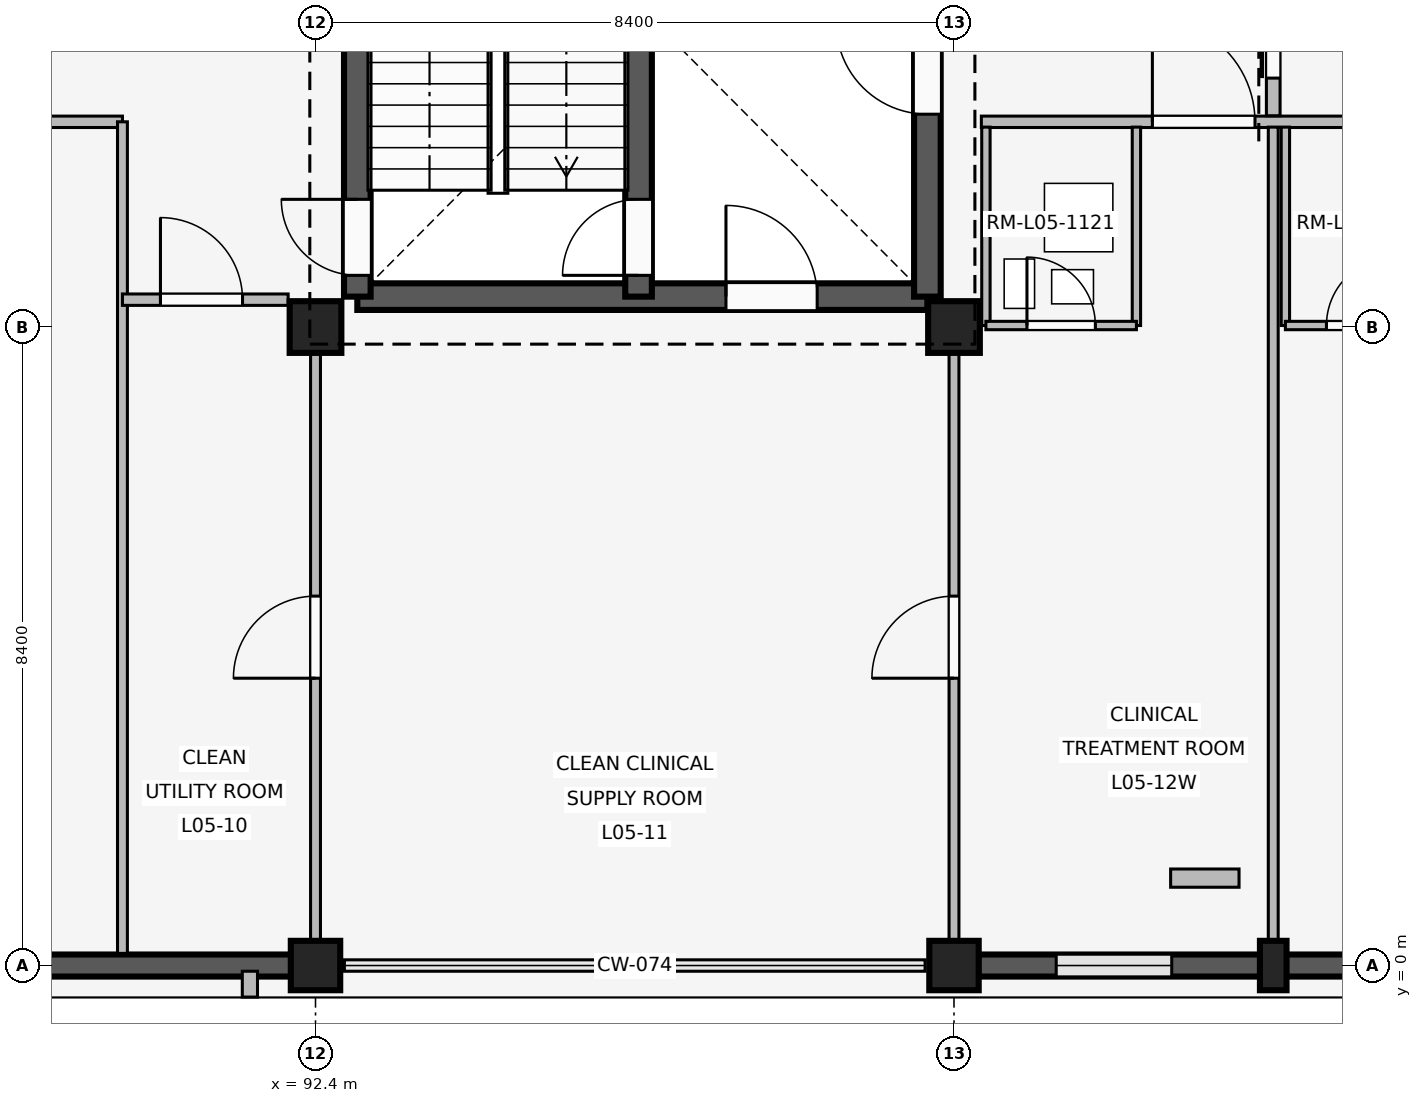
"""IFC4 building model, lengths in metres.
Left out: names, types, materials, properties, quantities, classifications, styles, units other than length and angle.
Written with IfcOpenShell. Run it as: python <this file> out.ifc"""

import sys

from ifc_helpers import new_model, si_unit, direction, frame, frame_2d, origin, origin_2d, place, context, subcontext, project, spatial, rectangle, extrude, element, fill, save


model = new_model("IFC4")
c1 = context("Model", 3, precision=1e-05, world=origin(), true_north=direction((0.0, 1.0)))
c2 = subcontext(c1, "Body", "Model", "MODEL_VIEW")
j1 = project(units=[si_unit("LENGTHUNIT", "METRE"), si_unit("PLANEANGLEUNIT", "RADIAN")], contexts=[c1])
p1 = place(None, origin())
s1 = spatial("IfcSite", under=j1, at=p1, CompositionType="ELEMENT")
p2 = place(p1, origin())
s2 = spatial("IfcBuilding", under=s1, at=p2, CompositionType="ELEMENT")
p3 = place(p2, frame((0.0, 0.0, 20.4)))
s3 = spatial("IfcBuildingStorey", under=s2, at=p3, CompositionType="ELEMENT", Elevation=20.4)
p4 = place(p3, frame((92.4, 0.0, 0.0), z_axis=(0.0, 0.0, 1.0), x_axis=(1.0, 0.0, 0.0)))
e1 = element("IfcColumn", 1, at=p4, inside=s3, PredefinedType="COLUMN", context=c2, shape_type="SweptSolid", body=[
    extrude(rectangle(XDim=0.65, YDim=0.65, at=origin_2d()), origin(), (0.0, 0.0, 1.0), 4.2),
])
p5 = place(p3, frame((92.4, 8.4, 0.0), z_axis=(0.0, 0.0, 1.0), x_axis=(1.0, 0.0, 0.0)))
e2 = element("IfcColumn", 2, at=p5, inside=s3, PredefinedType="COLUMN", context=c2, shape_type="SweptSolid", body=[
    extrude(rectangle(XDim=0.68, YDim=0.68, at=origin_2d()), origin(), (0.0, 0.0, 1.0), 4.2),
])
p6 = place(p3, frame((100.8, 0.0, 0.0), z_axis=(0.0, 0.0, 1.0), x_axis=(1.0, 0.0, 0.0)))
e3 = element("IfcColumn", 3, at=p6, inside=s3, PredefinedType="COLUMN", context=c2, shape_type="SweptSolid", body=[
    extrude(rectangle(XDim=0.65, YDim=0.65, at=origin_2d()), origin(), (0.0, 0.0, 1.0), 4.2),
])
p7 = place(p3, frame((100.8, 8.4, 0.0), z_axis=(0.0, 0.0, 1.0), x_axis=(1.0, 0.0, 0.0)))
e4 = element("IfcColumn", 4, at=p7, inside=s3, PredefinedType="COLUMN", context=c2, shape_type="SweptSolid", body=[
    extrude(rectangle(XDim=0.68, YDim=0.68, at=origin_2d()), origin(), (0.0, 0.0, 1.0), 4.2),
])
p8 = place(p3, frame((105.0, 0.0, 0.0), z_axis=(0.0, 0.0, 1.0), x_axis=(1.0, 0.0, 0.0)))
e5 = element("IfcColumn", 5, at=p8, inside=s3, PredefinedType="PILASTER", context=c2, shape_type="SweptSolid", body=[
    extrude(rectangle(XDim=0.35, YDim=0.65, at=origin_2d()), origin(), (0.0, 0.0, 1.0), 4.2),
])
p9 = place(p3, frame((92.08, 0.0, 0.0), z_axis=(0.0, 0.0, 1.0), x_axis=(-1.0, 0.0, 0.0)))
e6 = element("IfcWall", 6, at=p9, inside=s3, PredefinedType="SOLIDWALL", context=c2, shape_type="SweptSolid", body=[
    extrude(rectangle(XDim=7.76, YDim=0.29, at=frame_2d((3.88, 0.0))), origin(), (0.0, 0.0, 1.0), 3.34),
])
p10 = place(p9, frame((5.165, 0.0, 0.85)))
e7 = element("IfcOpeningElement", 7, at=p10, cuts=e6, PredefinedType="OPENING", context=c2, shape_type="SweptSolid", body=[
    extrude(rectangle(XDim=1.62, YDim=1.52, at=frame_2d((0.81, 0.76))), frame((0.0, 0.155, 0.0), z_axis=(0.0, -1.0, 0.0), x_axis=(1.0, 0.0, 0.0)), (0.0, 0.0, 1.0), 0.31),
])
p11 = place(p3, frame((91.537, -0.075, 0.0), z_axis=(0.0, 0.0, 1.0), x_axis=(0.0, -1.0, 0.0)))
e8 = element("IfcWall", 8, at=p11, inside=s3, PredefinedType="ELEMENTEDWALL", context=c2, shape_type="SweptSolid", body=[
    extrude(rectangle(XDim=0.34, YDim=0.2, at=frame_2d((0.17, 0.0))), origin(), (0.0, 0.0, 1.0), 3.32),
])
p12 = place(p3, frame((108.88, 0.0, 0.0), z_axis=(0.0, 0.0, 1.0), x_axis=(-1.0, 0.0, 0.0)))
e9 = element("IfcWall", 9, at=p12, inside=s3, PredefinedType="SOLIDWALL", context=c2, shape_type="SweptSolid", body=[
    extrude(rectangle(XDim=7.76, YDim=0.29, at=frame_2d((3.88, 0.0))), origin(), (0.0, 0.0, 1.0), 3.34),
])
p13 = place(p12, frame((1.025, 0.0, 0.85)))
e10 = element("IfcOpeningElement", 10, at=p13, cuts=e9, PredefinedType="OPENING", context=c2, shape_type="SweptSolid", body=[
    extrude(rectangle(XDim=1.52, YDim=1.65, at=frame_2d((0.76, 0.825))), frame((0.0, 0.155, 0.0), z_axis=(0.0, -1.0, 0.0), x_axis=(1.0, 0.0, 0.0)), (0.0, 0.0, 1.0), 0.31),
])
p14 = place(p12, frame((5.215, 0.0, 0.85)))
e11 = element("IfcOpeningElement", 11, at=p14, cuts=e9, PredefinedType="OPENING", context=c2, shape_type="SweptSolid", body=[
    extrude(rectangle(XDim=1.52, YDim=1.65, at=frame_2d((0.76, 0.825))), frame((0.0, 0.155, 0.0), z_axis=(0.0, -1.0, 0.0), x_axis=(1.0, 0.0, 0.0)), (0.0, 0.0, 1.0), 0.31),
])
p15 = place(p3, frame((92.95, 8.8, 0.0), z_axis=(0.0, 0.0, 1.0), x_axis=(1.0, 0.0, 0.0)))
e12 = element("IfcWall", 12, at=p15, inside=s3, PredefinedType="SHEAR", context=c2, shape_type="SweptSolid", body=[
    extrude(rectangle(XDim=7.5, YDim=0.35, at=frame_2d((3.75, 0.0))), origin(), (0.0, 0.0, 1.0), 3.92),
])
p16 = place(p15, frame((4.85, 0.0, 0.0)))
e13 = element("IfcOpeningElement", 13, at=p16, cuts=e12, PredefinedType="OPENING", context=c2, shape_type="SweptSolid", body=[
    extrude(rectangle(XDim=1.2, YDim=2.2, at=frame_2d((0.6, 1.1))), frame((0.0, 0.185, 0.0), z_axis=(0.0, -1.0, 0.0), x_axis=(1.0, 0.0, 0.0)), (0.0, 0.0, 1.0), 0.37),
])
p17 = place(p3, frame((92.95, 8.8, 0.0), z_axis=(0.0, 0.0, 1.0), x_axis=(0.0, 1.0, 0.0)))
e14 = element("IfcWall", 14, at=p17, inside=s3, PredefinedType="SHEAR", context=c2, shape_type="SweptSolid", body=[
    extrude(rectangle(XDim=7.55, YDim=0.35, at=frame_2d((3.775, 0.0))), origin(), (0.0, 0.0, 1.0), 3.92),
])
p18 = place(p17, frame((0.28, 0.0, 0.0)))
e15 = element("IfcOpeningElement", 15, at=p18, cuts=e14, PredefinedType="OPENING", context=c2, shape_type="SweptSolid", body=[
    extrude(rectangle(XDim=1.0, YDim=2.15, at=frame_2d((0.5, 1.075))), frame((0.0, 0.185, 0.0), z_axis=(0.0, -1.0, 0.0), x_axis=(1.0, 0.0, 0.0)), (0.0, 0.0, 1.0), 0.37),
])
p19 = place(p3, frame((100.45, 8.8, 0.0), z_axis=(0.0, 0.0, 1.0), x_axis=(0.0, 1.0, 0.0)))
e16 = element("IfcWall", 16, at=p19, inside=s3, PredefinedType="SHEAR", context=c2, shape_type="SweptSolid", body=[
    extrude(rectangle(XDim=7.55, YDim=0.35, at=frame_2d((3.775, 0.0))), origin(), (0.0, 0.0, 1.0), 3.92),
])
p20 = place(p19, frame((2.4, 0.0, 0.0)))
e17 = element("IfcOpeningElement", 17, at=p20, cuts=e16, PredefinedType="OPENING", context=c2, shape_type="SweptSolid", body=[
    extrude(rectangle(XDim=1.2, YDim=2.2, at=frame_2d((0.6, 1.1))), frame((0.0, 0.185, 0.0), z_axis=(0.0, -1.0, 0.0), x_axis=(1.0, 0.0, 0.0)), (0.0, 0.0, 1.0), 0.37),
])
p21 = place(p3, frame((96.65, 8.8, 0.0), z_axis=(0.0, 0.0, 1.0), x_axis=(0.0, 1.0, 0.0)))
e18 = element("IfcWall", 18, at=p21, inside=s3, PredefinedType="SHEAR", context=c2, shape_type="SweptSolid", body=[
    extrude(rectangle(XDim=7.55, YDim=0.35, at=frame_2d((3.775, 0.0))), origin(), (0.0, 0.0, 1.0), 3.92),
])
p22 = place(p21, frame((0.28, 0.0, 0.0)))
e19 = element("IfcOpeningElement", 19, at=p22, cuts=e18, PredefinedType="OPENING", context=c2, shape_type="SweptSolid", body=[
    extrude(rectangle(XDim=1.0, YDim=2.15, at=frame_2d((0.5, 1.075))), frame((0.0, 0.185, 0.0), z_axis=(0.0, -1.0, 0.0), x_axis=(1.0, 0.0, 0.0)), (0.0, 0.0, 1.0), 0.37),
])
p23 = place(p3, frame((84.08, 11.1, 0.0), z_axis=(0.0, 0.0, 1.0), x_axis=(1.0, 0.0, 0.0)))
e20 = element("IfcWall", 20, at=p23, inside=s3, PredefinedType="PARTITIONING", context=c2, shape_type="SweptSolid", body=[
    extrude(rectangle(XDim=5.78, YDim=0.15, at=frame_2d((2.89, 0.0))), origin(), (0.0, 0.0, 1.0), 3.32),
])
p24 = place(p23, frame((2.38, 0.0, 0.0)))
e21 = element("IfcOpeningElement", 21, at=p24, cuts=e20, PredefinedType="OPENING", context=c2, shape_type="SweptSolid", body=[
    extrude(rectangle(XDim=1.25, YDim=2.2, at=frame_2d((0.625, 1.1))), frame((0.0, 0.085, 0.0), z_axis=(0.0, -1.0, 0.0), x_axis=(1.0, 0.0, 0.0)), (0.0, 0.0, 1.0), 0.17),
])
p25 = place(p3, frame((89.86, 0.16, 0.0), z_axis=(0.0, 0.0, 1.0), x_axis=(0.0, 1.0, 0.0)))
e22 = element("IfcWall", 22, at=p25, inside=s3, PredefinedType="PARTITIONING", context=c2, shape_type="SweptSolid", body=[
    extrude(rectangle(XDim=10.94, YDim=0.13, at=frame_2d((5.47, 0.0))), origin(), (0.0, 0.0, 1.0), 3.32),
])
p26 = place(p3, frame((89.86, 8.76, 0.0), z_axis=(0.0, 0.0, 1.0), x_axis=(1.0, 0.0, 0.0)))
e23 = element("IfcWall", 23, at=p26, inside=s3, PredefinedType="PARTITIONING", context=c2, shape_type="SweptSolid", body=[
    extrude(rectangle(XDim=2.18, YDim=0.15, at=frame_2d((1.09, 0.0))), origin(), (0.0, 0.0, 1.0), 3.32),
])
p27 = place(p26, frame((0.5, 0.0, 0.0)))
e24 = element("IfcOpeningElement", 24, at=p27, cuts=e23, PredefinedType="OPENING", context=c2, shape_type="SweptSolid", body=[
    extrude(rectangle(XDim=1.08, YDim=2.15, at=frame_2d((0.54, 1.075))), frame((0.0, 0.085, 0.0), z_axis=(0.0, -1.0, 0.0), x_axis=(1.0, 0.0, 0.0)), (0.0, 0.0, 1.0), 0.17),
])
p28 = place(p3, frame((92.4, 0.14, 0.0), z_axis=(0.0, 0.0, 1.0), x_axis=(0.0, 1.0, 0.0)))
e25 = element("IfcWall", 25, at=p28, inside=s3, PredefinedType="PARTITIONING", context=c2, shape_type="SweptSolid", body=[
    extrude(rectangle(XDim=8.21, YDim=0.13, at=frame_2d((4.105, 0.0))), origin(), (0.0, 0.0, 1.0), 3.32),
])
p29 = place(p28, frame((3.64, 0.0, 0.0)))
e26 = element("IfcOpeningElement", 26, at=p29, cuts=e25, PredefinedType="OPENING", context=c2, shape_type="SweptSolid", body=[
    extrude(rectangle(XDim=1.08, YDim=2.15, at=frame_2d((0.54, 1.075))), frame((0.0, 0.075, 0.0), z_axis=(0.0, -1.0, 0.0), x_axis=(1.0, 0.0, 0.0)), (0.0, 0.0, 1.0), 0.15),
])
p30 = place(p3, frame((100.8, 0.14, 0.0), z_axis=(0.0, 0.0, 1.0), x_axis=(0.0, 1.0, 0.0)))
e27 = element("IfcWall", 27, at=p30, inside=s3, PredefinedType="PARTITIONING", context=c2, shape_type="SweptSolid", body=[
    extrude(rectangle(XDim=8.21, YDim=0.13, at=frame_2d((4.105, 0.0))), origin(), (0.0, 0.0, 1.0), 3.32),
])
p31 = place(p30, frame((3.64, 0.0, 0.0)))
e28 = element("IfcOpeningElement", 28, at=p31, cuts=e27, PredefinedType="OPENING", context=c2, shape_type="SweptSolid", body=[
    extrude(rectangle(XDim=1.08, YDim=2.15, at=frame_2d((0.54, 1.075))), frame((0.0, 0.075, 0.0), z_axis=(0.0, -1.0, 0.0), x_axis=(1.0, 0.0, 0.0)), (0.0, 0.0, 1.0), 0.15),
])
p32 = place(p3, frame((101.16, 11.1, 0.0), z_axis=(0.0, 0.0, 1.0), x_axis=(1.0, 0.0, 0.0)))
e29 = element("IfcWall", 29, at=p32, inside=s3, PredefinedType="PARTITIONING", context=c2, shape_type="SweptSolid", body=[
    extrude(rectangle(XDim=7.96, YDim=0.15, at=frame_2d((3.98, 0.0))), origin(), (0.0, 0.0, 1.0), 3.32),
])
p33 = place(p32, frame((2.25, 0.0, 0.0)))
e30 = element("IfcOpeningElement", 30, at=p33, cuts=e29, PredefinedType="OPENING", context=c2, shape_type="SweptSolid", body=[
    extrude(rectangle(XDim=1.35, YDim=2.25, at=frame_2d((0.675, 1.125))), frame((0.0, 0.085, 0.0), z_axis=(0.0, -1.0, 0.0), x_axis=(1.0, 0.0, 0.0)), (0.0, 0.0, 1.0), 0.17),
])
p34 = place(p32, frame((5.95, 0.0, 0.0)))
e31 = element("IfcOpeningElement", 31, at=p34, cuts=e29, PredefinedType="OPENING", context=c2, shape_type="SweptSolid", body=[
    extrude(rectangle(XDim=1.35, YDim=2.25, at=frame_2d((0.675, 1.125))), frame((0.0, 0.085, 0.0), z_axis=(0.0, -1.0, 0.0), x_axis=(1.0, 0.0, 0.0)), (0.0, 0.0, 1.0), 0.17),
])
p35 = place(p3, frame((105.0, 0.1, 0.0), z_axis=(0.0, 0.0, 1.0), x_axis=(0.0, 1.0, 0.0)))
e32 = element("IfcWall", 32, at=p35, inside=s3, PredefinedType="PARTITIONING", context=c2, shape_type="SweptSolid", body=[
    extrude(rectangle(XDim=10.93, YDim=0.13, at=frame_2d((5.465, 0.0))), origin(), (0.0, 0.0, 1.0), 3.32),
])
for number, where, z_axis, x_axis in (
    (33, (101.22, 8.42, 0.0), (0.0, 0.0, 1.0), (0.0, 1.0, 0.0)),
    (34, (103.2, 8.42, 0.0), (0.0, 0.0, 1.0), (0.0, 1.0, 0.0)),
):
    element("IfcWall", number, at=place(p3, frame(where, z_axis=z_axis, x_axis=x_axis)), inside=s3, PredefinedType="PARTITIONING", context=c2, shape_type="SweptSolid", body=[
        extrude(rectangle(XDim=2.61, YDim=0.11, at=frame_2d((1.305, 0.0))), origin(), (0.0, 0.0, 1.0), 3.32),
    ])
p36 = place(p3, frame((101.22, 8.42, 0.0), z_axis=(0.0, 0.0, 1.0), x_axis=(1.0, 0.0, 0.0)))
e35 = element("IfcWall", 35, at=p36, inside=s3, PredefinedType="PARTITIONING", context=c2, shape_type="SweptSolid", body=[
    extrude(rectangle(XDim=1.98, YDim=0.11, at=frame_2d((0.99, 0.0))), origin(), (0.0, 0.0, 1.0), 3.32),
])
p37 = place(p36, frame((0.54, 0.0, 0.0)))
e36 = element("IfcOpeningElement", 36, at=p37, cuts=e35, PredefinedType="OPENING", context=c2, shape_type="SweptSolid", body=[
    extrude(rectangle(XDim=0.9, YDim=2.1, at=frame_2d((0.45, 1.05))), frame((0.0, 0.065, 0.0), z_axis=(0.0, -1.0, 0.0), x_axis=(1.0, 0.0, 0.0)), (0.0, 0.0, 1.0), 0.13),
])
p38 = place(p3, frame((105.16, 8.42, 0.0), z_axis=(0.0, 0.0, 1.0), x_axis=(0.0, 1.0, 0.0)))
e37 = element("IfcWall", 37, at=p38, inside=s3, PredefinedType="PARTITIONING", context=c2, shape_type="SweptSolid", body=[
    extrude(rectangle(XDim=2.61, YDim=0.11, at=frame_2d((1.305, 0.0))), origin(), (0.0, 0.0, 1.0), 3.32),
])
p39 = place(p3, frame((105.16, 8.42, 0.0), z_axis=(0.0, 0.0, 1.0), x_axis=(1.0, 0.0, 0.0)))
e38 = element("IfcWall", 38, at=p39, inside=s3, PredefinedType="PARTITIONING", context=c2, shape_type="SweptSolid", body=[
    extrude(rectangle(XDim=1.98, YDim=0.11, at=frame_2d((0.99, 0.0))), origin(), (0.0, 0.0, 1.0), 3.32),
])
p40 = place(p39, frame((0.54, 0.0, 0.0)))
e39 = element("IfcOpeningElement", 39, at=p40, cuts=e38, PredefinedType="OPENING", context=c2, shape_type="SweptSolid", body=[
    extrude(rectangle(XDim=0.9, YDim=2.1, at=frame_2d((0.45, 1.05))), frame((0.0, 0.065, 0.0), z_axis=(0.0, -1.0, 0.0), x_axis=(1.0, 0.0, 0.0)), (0.0, 0.0, 1.0), 0.13),
])
p41 = place(p3, frame((103.65, 1.15, 0.0), z_axis=(0.0, 0.0, 1.0), x_axis=(1.0, 0.0, 0.0)))
e40 = element("IfcWall", 40, at=p41, inside=s3, PredefinedType="PLUMBINGWALL", context=c2, shape_type="SweptSolid", body=[
    extrude(rectangle(XDim=0.9, YDim=0.24, at=frame_2d((0.45, 0.0))), origin(), (0.0, 0.0, 1.0), 3.32),
])
p42 = place(p3, frame((105.0, 11.18, 0.0), z_axis=(0.0, 0.0, 1.0), x_axis=(0.0, 1.0, 0.0)))
e41 = element("IfcWall", 41, at=p42, inside=s3, PredefinedType="PARTITIONING", context=c2, shape_type="SweptSolid", body=[
    extrude(rectangle(XDim=2.84, YDim=0.18, at=frame_2d((1.42, 0.0))), origin(), (0.0, 0.0, 1.0), 3.32),
])
p43 = place(p42, frame((0.495, 0.0, 0.0)))
e42 = element("IfcOpeningElement", 42, at=p43, cuts=e41, PredefinedType="OPENING", context=c2, shape_type="SweptSolid", body=[
    extrude(rectangle(XDim=1.85, YDim=2.3, at=frame_2d((0.925, 1.15))), frame((0.0, 0.1, 0.0), z_axis=(0.0, -1.0, 0.0), x_axis=(1.0, 0.0, 0.0)), (0.0, 0.0, 1.0), 0.2),
])
p44 = place(p14, origin())
e43 = element("IfcWindow", 43, at=p44, inside=s3, PartitioningType="SINGLE_PANEL", PredefinedType="WINDOW", context=c2, shape_type="SweptSolid", body=[
    extrude(rectangle(XDim=1.52, YDim=1.65, at=frame_2d((0.76, 0.825))), frame((0.0, 0.03, 0.0), z_axis=(0.0, -1.0, 0.0), x_axis=(1.0, 0.0, 0.0)), (0.0, 0.0, 1.0), 0.06),
])
fill(e11, e43)
p45 = place(p20, origin())
e44 = element("IfcDoor", 44, at=p45, inside=s3, OperationType="SINGLE_SWING_RIGHT", PredefinedType="DOOR", context=c2, shape_type="SweptSolid", body=[
    extrude(rectangle(XDim=1.2, YDim=2.2, at=frame_2d((0.6, 1.1))), frame((0.0, 0.025, 0.0), z_axis=(0.0, -1.0, 0.0), x_axis=(1.0, 0.0, 0.0)), (0.0, 0.0, 1.0), 0.05),
])
fill(e17, e44)
p46 = place(p16, origin())
e45 = element("IfcDoor", 45, at=p46, inside=s3, OperationType="SINGLE_SWING_LEFT", PredefinedType="DOOR", context=c2, shape_type="SweptSolid", body=[
    extrude(rectangle(XDim=1.2, YDim=2.2, at=frame_2d((0.6, 1.1))), frame((0.0, 0.025, 0.0), z_axis=(0.0, -1.0, 0.0), x_axis=(1.0, 0.0, 0.0)), (0.0, 0.0, 1.0), 0.05),
])
fill(e13, e45)
p47 = place(p18, origin())
e46 = element("IfcDoor", 46, at=p47, inside=s3, OperationType="SINGLE_SWING_RIGHT", PredefinedType="DOOR", context=c2, shape_type="SweptSolid", body=[
    extrude(rectangle(XDim=1.0, YDim=2.15, at=frame_2d((0.5, 1.075))), frame((0.0, 0.025, 0.0), z_axis=(0.0, -1.0, 0.0), x_axis=(1.0, 0.0, 0.0)), (0.0, 0.0, 1.0), 0.05),
])
fill(e15, e46)
p48 = place(p22, origin())
e47 = element("IfcDoor", 47, at=p48, inside=s3, OperationType="SINGLE_SWING_LEFT", PredefinedType="DOOR", context=c2, shape_type="SweptSolid", body=[
    extrude(rectangle(XDim=1.0, YDim=2.15, at=frame_2d((0.5, 1.075))), frame((0.0, 0.025, 0.0), z_axis=(0.0, -1.0, 0.0), x_axis=(1.0, 0.0, 0.0)), (0.0, 0.0, 1.0), 0.05),
])
fill(e19, e47)
p49 = place(p27, origin())
e48 = element("IfcDoor", 48, at=p49, inside=s3, OperationType="SINGLE_SWING_LEFT", PredefinedType="DOOR", context=c2, shape_type="SweptSolid", body=[
    extrude(rectangle(XDim=1.08, YDim=2.15, at=frame_2d((0.54, 1.075))), frame((0.0, 0.025, 0.0), z_axis=(0.0, -1.0, 0.0), x_axis=(1.0, 0.0, 0.0)), (0.0, 0.0, 1.0), 0.05),
])
fill(e24, e48)
p50 = place(p29, origin())
e49 = element("IfcDoor", 49, at=p50, inside=s3, OperationType="SINGLE_SWING_LEFT", PredefinedType="DOOR", context=c2, shape_type="SweptSolid", body=[
    extrude(rectangle(XDim=1.08, YDim=2.15, at=frame_2d((0.54, 1.075))), frame((0.0, 0.025, 0.0), z_axis=(0.0, -1.0, 0.0), x_axis=(1.0, 0.0, 0.0)), (0.0, 0.0, 1.0), 0.05),
])
fill(e26, e49)
p51 = place(p31, origin())
e50 = element("IfcDoor", 50, at=p51, inside=s3, OperationType="SINGLE_SWING_LEFT", PredefinedType="DOOR", context=c2, shape_type="SweptSolid", body=[
    extrude(rectangle(XDim=1.08, YDim=2.15, at=frame_2d((0.54, 1.075))), frame((0.0, 0.025, 0.0), z_axis=(0.0, -1.0, 0.0), x_axis=(1.0, 0.0, 0.0)), (0.0, 0.0, 1.0), 0.05),
])
fill(e28, e50)
p52 = place(p33, origin())
e51 = element("IfcDoor", 51, at=p52, inside=s3, OperationType="SINGLE_SWING_LEFT", PredefinedType="DOOR", context=c2, shape_type="SweptSolid", body=[
    extrude(rectangle(XDim=1.35, YDim=2.25, at=frame_2d((0.675, 1.125))), frame((0.0, 0.025, 0.0), z_axis=(0.0, -1.0, 0.0), x_axis=(1.0, 0.0, 0.0)), (0.0, 0.0, 1.0), 0.05),
])
fill(e30, e51)
p53 = place(p37, origin())
e52 = element("IfcDoor", 52, at=p53, inside=s3, OperationType="SINGLE_SWING_LEFT", PredefinedType="DOOR", context=c2, shape_type="SweptSolid", body=[
    extrude(rectangle(XDim=0.9, YDim=2.1, at=frame_2d((0.45, 1.05))), frame((0.0, 0.025, 0.0), z_axis=(0.0, -1.0, 0.0), x_axis=(1.0, 0.0, 0.0)), (0.0, 0.0, 1.0), 0.05),
])
fill(e36, e52)
p54 = place(p40, origin())
e53 = element("IfcDoor", 53, at=p54, inside=s3, OperationType="SINGLE_SWING_RIGHT", PredefinedType="DOOR", context=c2, shape_type="SweptSolid", body=[
    extrude(rectangle(XDim=0.9, YDim=2.1, at=frame_2d((0.45, 1.05))), frame((0.0, 0.025, 0.0), z_axis=(0.0, -1.0, 0.0), x_axis=(1.0, 0.0, 0.0)), (0.0, 0.0, 1.0), 0.05),
])
fill(e39, e53)
p55 = place(p43, origin())
e54 = element("IfcDoor", 54, at=p55, inside=s3, OperationType="SLIDING_TO_LEFT", PredefinedType="DOOR", context=c2, shape_type="SweptSolid", body=[
    extrude(rectangle(XDim=1.85, YDim=2.3, at=frame_2d((0.925, 1.15))), frame((0.0, 0.025, 0.0), z_axis=(0.0, -1.0, 0.0), x_axis=(1.0, 0.0, 0.0)), (0.0, 0.0, 1.0), 0.05),
])
fill(e42, e54)
save(model, sys.argv[1])
